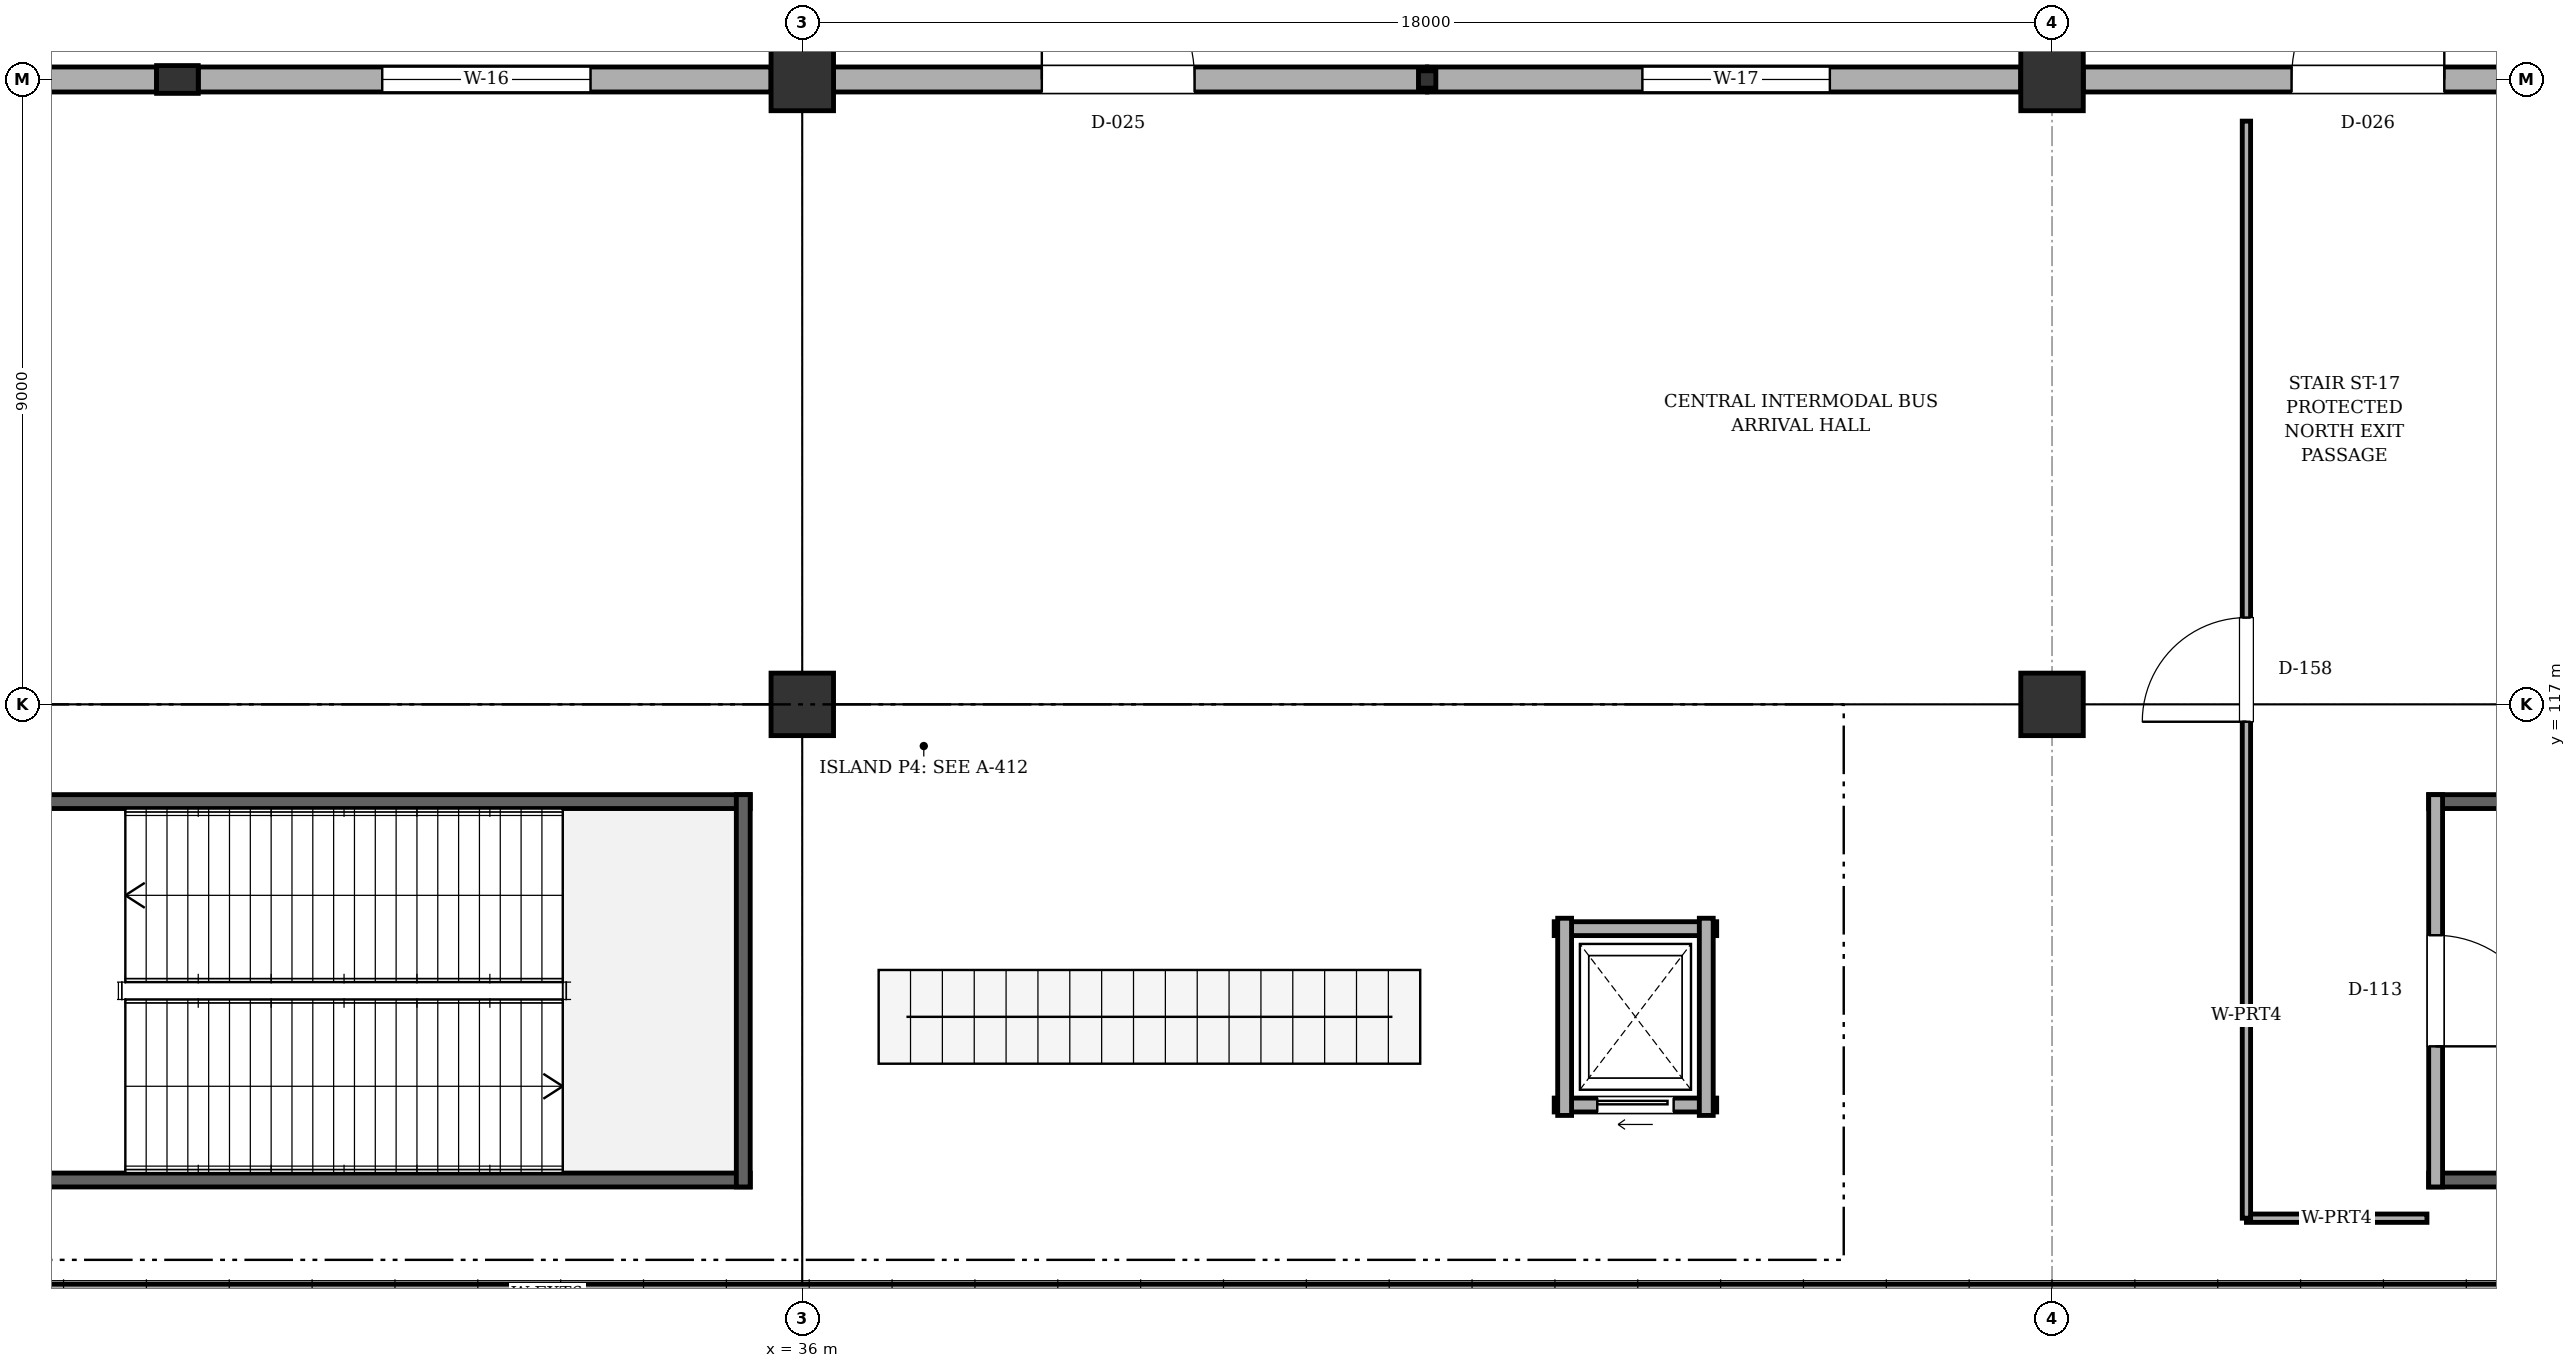
"""IFC4 building model, lengths in metres.
Left out: names, types, materials, properties, quantities, classifications, styles, units other than length and angle.
Written with IfcOpenShell. Run it as: python <this file> out.ifc"""

import sys

from ifc_helpers import new_model, si_unit, direction, frame, frame_2d, origin, origin_2d, place, context, subcontext, project, spatial, rectangle, i_section, extrude, element, fill, save


model = new_model("IFC4")
c1 = context("Model", 3, precision=1e-05, world=origin(), true_north=direction((0.0, 1.0)))
c2 = subcontext(c1, "Body", "Model", "MODEL_VIEW")
j1 = project(units=[si_unit("LENGTHUNIT", "METRE"), si_unit("PLANEANGLEUNIT", "RADIAN")], contexts=[c1])
p1 = place(None, origin())
s1 = spatial("IfcSite", under=j1, at=p1, CompositionType="ELEMENT")
p2 = place(p1, origin())
s2 = spatial("IfcBuilding", under=s1, at=p2, CompositionType="ELEMENT")
p3 = place(p2, origin())
s3 = spatial("IfcBuildingStorey", under=s2, at=p3, CompositionType="ELEMENT", Elevation=0.0)
for number, where, z_axis, x_axis in (
    (1, (36.0, 117.0, 0.0), (0.0, 0.0, 1.0), (1.0, 0.0, 0.0)),
    (2, (36.0, 126.0, 0.0), (0.0, 0.0, 1.0), (1.0, 0.0, 0.0)),
    (3, (54.0, 117.0, 0.0), (0.0, 0.0, 1.0), (1.0, 0.0, 0.0)),
    (4, (54.0, 126.0, 0.0), (0.0, 0.0, 1.0), (1.0, 0.0, 0.0)),
):
    element("IfcColumn", number, at=place(p3, frame(where, z_axis=z_axis, x_axis=x_axis)), inside=s3, PredefinedType="COLUMN", context=c2, shape_type="SweptSolid", body=[
        extrude(rectangle(XDim=0.9, YDim=0.9, at=origin_2d()), origin(), (0.0, 0.0, 1.0), 6.6),
    ])
p4 = place(p3, frame((27.0, 126.0, 0.0), z_axis=(0.0, 0.0, 1.0), x_axis=(1.0, 0.0, 0.0)))
e5 = element("IfcColumn", 5, at=p4, inside=s3, PredefinedType="PILASTER", context=c2, shape_type="SweptSolid", body=[
    extrude(rectangle(XDim=0.6, YDim=0.4, at=origin_2d()), origin(), (0.0, 0.0, 1.0), 6.28),
])
p5 = place(p3, frame((45.0, 126.0, 0.0), z_axis=(0.0, 0.0, 1.0), x_axis=(1.0, 0.0, 0.0)))
e6 = element("IfcColumn", 6, at=p5, inside=s3, PredefinedType="PILASTER", context=c2, shape_type="SweptSolid", body=[
    extrude(i_section(OverallWidth=0.25, OverallDepth=0.25, WebThickness=0.009, FlangeThickness=0.014, FilletRadius=0.016, at=origin_2d()), origin(), (0.0, 0.0, 1.0), 6.28),
])
p6 = place(p3, frame((0.15, 108.5, -1.25), z_axis=(0.0, 0.0, 1.0), x_axis=(1.0, 0.0, 0.0)))
e7 = element("IfcWall", 7, at=p6, inside=s3, PredefinedType="SOLIDWALL", context=c2, shape_type="SweptSolid", body=[
    extrude(rectangle(XDim=107.7, YDim=0.3, at=frame_2d((53.85, 0.0))), origin(), (0.0, 0.0, 1.0), 0.87),
])
p7 = place(p3, frame((18.45, 126.0, 0.0), z_axis=(0.0, 0.0, 1.0), x_axis=(1.0, 0.0, 0.0)))
e8 = element("IfcWall", 8, at=p7, inside=s3, PredefinedType="SOLIDWALL", context=c2, shape_type="SweptSolid", body=[
    extrude(rectangle(XDim=8.25, YDim=0.36, at=frame_2d((4.125, 0.0))), origin(), (0.0, 0.0, 1.0), 5.79),
])
p8 = place(p7, frame((2.9, 0.0, 0.0)))
e9 = element("IfcOpeningElement", 9, at=p8, cuts=e8, PredefinedType="OPENING", context=c2, shape_type="SweptSolid", body=[
    extrude(rectangle(XDim=2.4, YDim=2.5, at=frame_2d((1.2, 1.25))), frame((0.0, 0.19, 0.0), z_axis=(0.0, -1.0, 0.0), x_axis=(1.0, 0.0, 0.0)), (0.0, 0.0, 1.0), 0.38),
])
p9 = place(p3, frame((27.3, 126.0, 0.0), z_axis=(0.0, 0.0, 1.0), x_axis=(1.0, 0.0, 0.0)))
e10 = element("IfcWall", 10, at=p9, inside=s3, PredefinedType="SOLIDWALL", context=c2, shape_type="SweptSolid", body=[
    extrude(rectangle(XDim=8.25, YDim=0.36, at=frame_2d((4.125, 0.0))), origin(), (0.0, 0.0, 1.0), 5.79),
])
p10 = place(p9, frame((2.65, 0.0, 0.95)))
e11 = element("IfcOpeningElement", 11, at=p10, cuts=e10, PredefinedType="OPENING", context=c2, shape_type="SweptSolid", body=[
    extrude(rectangle(XDim=3.0, YDim=2.1, at=frame_2d((1.5, 1.05))), frame((0.0, 0.19, 0.0), z_axis=(0.0, -1.0, 0.0), x_axis=(1.0, 0.0, 0.0)), (0.0, 0.0, 1.0), 0.38),
])
p11 = place(p3, frame((36.45, 126.0, 0.0), z_axis=(0.0, 0.0, 1.0), x_axis=(1.0, 0.0, 0.0)))
e12 = element("IfcWall", 12, at=p11, inside=s3, PredefinedType="SOLIDWALL", context=c2, shape_type="SweptSolid", body=[
    extrude(rectangle(XDim=8.546, YDim=0.36, at=frame_2d((4.273, 0.0))), origin(), (0.0, 0.0, 1.0), 5.79),
])
p12 = place(p11, frame((3.0, 0.0, 0.0)))
e13 = element("IfcOpeningElement", 13, at=p12, cuts=e12, PredefinedType="OPENING", context=c2, shape_type="SweptSolid", body=[
    extrude(rectangle(XDim=2.2, YDim=2.45, at=frame_2d((1.1, 1.225))), frame((0.0, 0.19, 0.0), z_axis=(0.0, -1.0, 0.0), x_axis=(1.0, 0.0, 0.0)), (0.0, 0.0, 1.0), 0.38),
])
p13 = place(p3, frame((45.004, 126.0, 0.0), z_axis=(0.0, 0.0, 1.0), x_axis=(1.0, 0.0, 0.0)))
e14 = element("IfcWall", 14, at=p13, inside=s3, PredefinedType="SOLIDWALL", context=c2, shape_type="SweptSolid", body=[
    extrude(rectangle(XDim=8.546, YDim=0.36, at=frame_2d((4.273, 0.0))), origin(), (0.0, 0.0, 1.0), 5.79),
])
p14 = place(p13, frame((3.095, 0.0, 0.95)))
e15 = element("IfcOpeningElement", 15, at=p14, cuts=e14, PredefinedType="OPENING", context=c2, shape_type="SweptSolid", body=[
    extrude(rectangle(XDim=2.7, YDim=2.1, at=frame_2d((1.35, 1.05))), frame((0.0, 0.19, 0.0), z_axis=(0.0, -1.0, 0.0), x_axis=(1.0, 0.0, 0.0)), (0.0, 0.0, 1.0), 0.38),
])
p15 = place(p3, frame((54.45, 126.0, 0.0), z_axis=(0.0, 0.0, 1.0), x_axis=(1.0, 0.0, 0.0)))
e16 = element("IfcWall", 16, at=p15, inside=s3, PredefinedType="SOLIDWALL", context=c2, shape_type="SweptSolid", body=[
    extrude(rectangle(XDim=8.25, YDim=0.36, at=frame_2d((4.125, 0.0))), origin(), (0.0, 0.0, 1.0), 5.79),
])
p16 = place(p15, frame((3.0, 0.0, 0.0)))
e17 = element("IfcOpeningElement", 17, at=p16, cuts=e16, PredefinedType="OPENING", context=c2, shape_type="SweptSolid", body=[
    extrude(rectangle(XDim=2.2, YDim=2.45, at=frame_2d((1.1, 1.225))), frame((0.0, 0.19, 0.0), z_axis=(0.0, -1.0, 0.0), x_axis=(1.0, 0.0, 0.0)), (0.0, 0.0, 1.0), 0.38),
])
for number, where, z_axis, x_axis in (
    (18, (23.425, 110.15, 0.0), (0.0, 0.0, 1.0), (1.0, 0.0, 0.0)),
    (19, (35.25, 115.6, 0.0), (0.0, 0.0, 1.0), (-1.0, 0.0, 0.0)),
):
    element("IfcWall", number, at=place(p3, frame(where, z_axis=z_axis, x_axis=x_axis)), inside=s3, PredefinedType="SOLIDWALL", context=c2, shape_type="SweptSolid", body=[
        extrude(rectangle(XDim=11.825, YDim=0.2, at=frame_2d((5.913, 0.0))), origin(), (0.0, 0.0, 1.0), 6.32),
    ])
p17 = place(p3, frame((35.15, 110.05, 0.0), z_axis=(0.0, 0.0, 1.0), x_axis=(0.0, 1.0, 0.0)))
e20 = element("IfcWall", 20, at=p17, inside=s3, PredefinedType="SOLIDWALL", context=c2, shape_type="SweptSolid", body=[
    extrude(rectangle(XDim=5.65, YDim=0.2, at=frame_2d((2.825, 0.0))), origin(), (0.0, 0.0, 1.0), 6.32),
])
for number, where, z_axis, x_axis in (
    (21, (59.425, 110.15, 0.0), (0.0, 0.0, 1.0), (1.0, 0.0, 0.0)),
    (22, (71.25, 115.6, 0.0), (0.0, 0.0, 1.0), (-1.0, 0.0, 0.0)),
):
    element("IfcWall", number, at=place(p3, frame(where, z_axis=z_axis, x_axis=x_axis)), inside=s3, PredefinedType="SOLIDWALL", context=c2, shape_type="SweptSolid", body=[
        extrude(rectangle(XDim=11.825, YDim=0.2, at=frame_2d((5.913, 0.0))), origin(), (0.0, 0.0, 1.0), 6.32),
    ])
p18 = place(p3, frame((59.525, 115.7, 0.0), z_axis=(0.0, 0.0, 1.0), x_axis=(0.0, -1.0, 0.0)))
e23 = element("IfcWall", 23, at=p18, inside=s3, PredefinedType="SOLIDWALL", context=c2, shape_type="SweptSolid", body=[
    extrude(rectangle(XDim=5.65, YDim=0.2, at=frame_2d((2.825, 0.0))), origin(), (0.0, 0.0, 1.0), 4.4),
])
p19 = place(p18, frame((2.025, 0.0, 0.0)))
e24 = element("IfcOpeningElement", 24, at=p19, cuts=e23, PredefinedType="OPENING", context=c2, shape_type="SweptSolid", body=[
    extrude(rectangle(XDim=1.6, YDim=2.15, at=frame_2d((0.8, 1.075))), frame((0.0, 0.11, 0.0), z_axis=(0.0, -1.0, 0.0), x_axis=(1.0, 0.0, 0.0)), (0.0, 0.0, 1.0), 0.22),
])
p20 = place(p3, frame((46.83, 111.23, 0.0), z_axis=(0.0, 0.0, 1.0), x_axis=(1.0, 0.0, 0.0)))
e25 = element("IfcWall", 25, at=p20, inside=s3, PredefinedType="SOLIDWALL", context=c2, shape_type="SweptSolid", body=[
    extrude(rectangle(XDim=2.34, YDim=0.2, at=frame_2d((1.17, 0.0))), origin(), (0.0, 0.0, 1.0), 4.4),
])
p21 = place(p20, frame((0.62, 0.0, 0.0)))
e26 = element("IfcOpeningElement", 26, at=p21, cuts=e25, PredefinedType="OPENING", context=c2, shape_type="SweptSolid", body=[
    extrude(rectangle(XDim=1.1, YDim=2.15, at=frame_2d((0.55, 1.075))), frame((0.0, 0.11, 0.0), z_axis=(0.0, -1.0, 0.0), x_axis=(1.0, 0.0, 0.0)), (0.0, 0.0, 1.0), 0.22),
])
p22 = place(p3, frame((49.17, 113.77, 0.0), z_axis=(0.0, 0.0, 1.0), x_axis=(-1.0, 0.0, 0.0)))
e27 = element("IfcWall", 27, at=p22, inside=s3, PredefinedType="SOLIDWALL", context=c2, shape_type="SweptSolid", body=[
    extrude(rectangle(XDim=2.34, YDim=0.2, at=frame_2d((1.17, 0.0))), origin(), (0.0, 0.0, 1.0), 4.4),
])
for number, where, z_axis, x_axis in (
    (28, (46.98, 113.92, 0.0), (0.0, 0.0, 1.0), (0.0, -1.0, 0.0)),
    (29, (49.02, 111.08, 0.0), (0.0, 0.0, 1.0), (0.0, 1.0, 0.0)),
):
    element("IfcWall", number, at=place(p3, frame(where, z_axis=z_axis, x_axis=x_axis)), inside=s3, PredefinedType="SOLIDWALL", context=c2, shape_type="SweptSolid", body=[
        extrude(rectangle(XDim=2.84, YDim=0.2, at=frame_2d((1.42, 0.0))), origin(), (0.0, 0.0, 1.0), 4.4),
    ])
p23 = place(p3, frame((59.4, 109.6, 0.0), z_axis=(0.0, 0.0, 1.0), x_axis=(-1.0, 0.0, 0.0)))
e30 = element("IfcWall", 30, at=p23, inside=s3, PredefinedType="PARTITIONING", context=c2, shape_type="SweptSolid", body=[
    extrude(rectangle(XDim=2.6, YDim=0.12, at=frame_2d((1.3, 0.0))), origin(), (0.0, 0.0, 1.0), 4.4),
])
p24 = place(p3, frame((56.8, 109.6, 0.0), z_axis=(0.0, 0.0, 1.0), x_axis=(0.0, 1.0, 0.0)))
e31 = element("IfcWall", 31, at=p24, inside=s3, PredefinedType="PARTITIONING", context=c2, shape_type="SweptSolid", body=[
    extrude(rectangle(XDim=15.8, YDim=0.12, at=frame_2d((7.9, 0.0))), origin(), (0.0, 0.0, 1.0), 4.4),
])
p25 = place(p24, frame((7.15, 0.0, 0.0)))
e32 = element("IfcOpeningElement", 32, at=p25, cuts=e31, PredefinedType="OPENING", context=c2, shape_type="SweptSolid", body=[
    extrude(rectangle(XDim=1.5, YDim=2.15, at=frame_2d((0.75, 1.075))), frame((0.0, 0.07, 0.0), z_axis=(0.0, -1.0, 0.0), x_axis=(1.0, 0.0, 0.0)), (0.0, 0.0, 1.0), 0.14),
])
p26 = place(p10, origin())
e33 = element("IfcWindow", 33, at=p26, inside=s3, PartitioningType="SINGLE_PANEL", PredefinedType="WINDOW", context=c2, shape_type="SweptSolid", body=[
    extrude(rectangle(XDim=3.0, YDim=2.1, at=frame_2d((1.5, 1.05))), frame((0.0, 0.03, 0.0), z_axis=(0.0, -1.0, 0.0), x_axis=(1.0, 0.0, 0.0)), (0.0, 0.0, 1.0), 0.06),
])
fill(e11, e33)
p27 = place(p12, origin())
e34 = element("IfcDoor", 34, at=p27, inside=s3, OperationType="SINGLE_SWING_LEFT", PredefinedType="DOOR", context=c2, shape_type="SweptSolid", body=[
    extrude(rectangle(XDim=2.2, YDim=2.45, at=frame_2d((1.1, 1.225))), frame((0.0, 0.025, 0.0), z_axis=(0.0, -1.0, 0.0), x_axis=(1.0, 0.0, 0.0)), (0.0, 0.0, 1.0), 0.05),
])
fill(e13, e34)
p28 = place(p14, origin())
e35 = element("IfcWindow", 35, at=p28, inside=s3, PartitioningType="SINGLE_PANEL", PredefinedType="WINDOW", context=c2, shape_type="SweptSolid", body=[
    extrude(rectangle(XDim=2.7, YDim=2.1, at=frame_2d((1.35, 1.05))), frame((0.0, 0.03, 0.0), z_axis=(0.0, -1.0, 0.0), x_axis=(1.0, 0.0, 0.0)), (0.0, 0.0, 1.0), 0.06),
])
fill(e15, e35)
p29 = place(p16, origin())
e36 = element("IfcDoor", 36, at=p29, inside=s3, OperationType="SINGLE_SWING_RIGHT", PredefinedType="DOOR", context=c2, shape_type="SweptSolid", body=[
    extrude(rectangle(XDim=2.2, YDim=2.45, at=frame_2d((1.1, 1.225))), frame((0.0, 0.025, 0.0), z_axis=(0.0, -1.0, 0.0), x_axis=(1.0, 0.0, 0.0)), (0.0, 0.0, 1.0), 0.05),
])
fill(e17, e36)
p30 = place(p19, origin())
e37 = element("IfcDoor", 37, at=p30, inside=s3, OperationType="SINGLE_SWING_RIGHT", PredefinedType="DOOR", context=c2, shape_type="SweptSolid", body=[
    extrude(rectangle(XDim=1.6, YDim=2.15, at=frame_2d((0.8, 1.075))), frame((0.0, 0.025, 0.0), z_axis=(0.0, -1.0, 0.0), x_axis=(1.0, 0.0, 0.0)), (0.0, 0.0, 1.0), 0.05),
])
fill(e24, e37)
p31 = place(p21, origin())
e38 = element("IfcDoor", 38, at=p31, inside=s3, OperationType="SLIDING_TO_LEFT", PredefinedType="DOOR", context=c2, shape_type="SweptSolid", body=[
    extrude(rectangle(XDim=1.1, YDim=2.15, at=frame_2d((0.55, 1.075))), frame((0.0, 0.025, 0.0), z_axis=(0.0, -1.0, 0.0), x_axis=(1.0, 0.0, 0.0)), (0.0, 0.0, 1.0), 0.05),
])
fill(e26, e38)
p32 = place(p25, origin())
e39 = element("IfcDoor", 39, at=p32, inside=s3, OperationType="SINGLE_SWING_LEFT", PredefinedType="DOOR", context=c2, shape_type="SweptSolid", body=[
    extrude(rectangle(XDim=1.5, YDim=2.15, at=frame_2d((0.75, 1.075))), frame((0.0, 0.025, 0.0), z_axis=(0.0, -1.0, 0.0), x_axis=(1.0, 0.0, 0.0)), (0.0, 0.0, 1.0), 0.05),
])
fill(e32, e39)
save(model, sys.argv[1])
